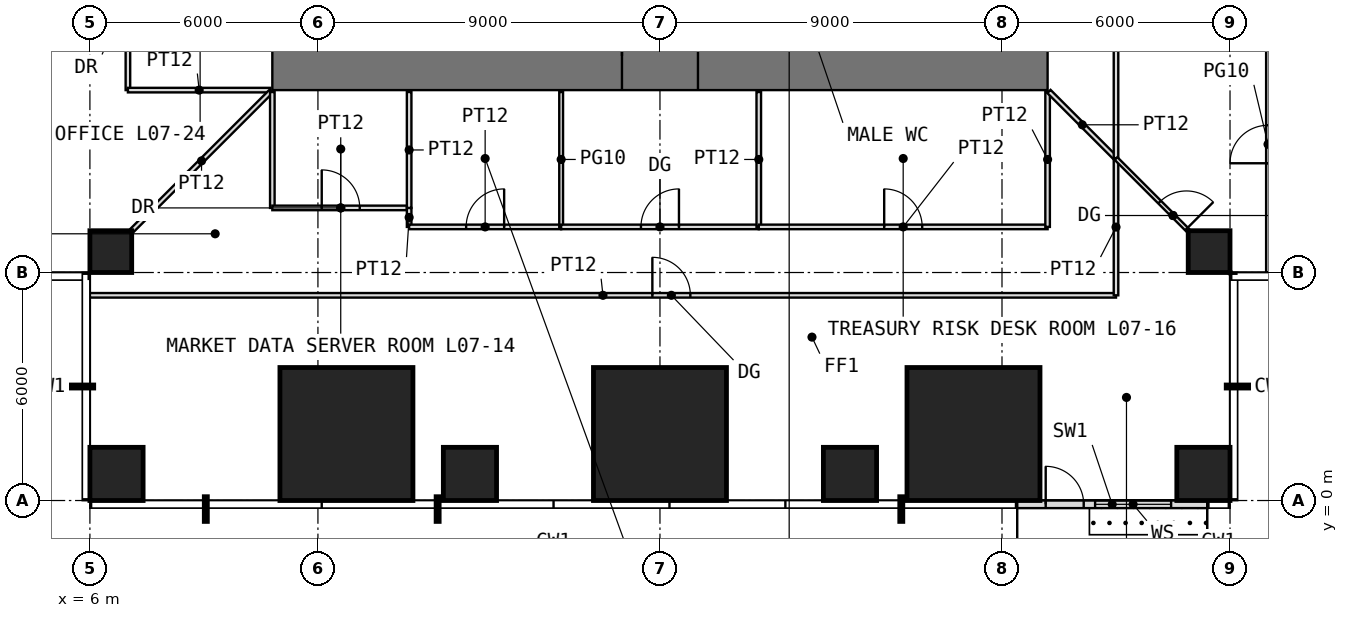
"""IFC4 building model, lengths in metres.
Left out: names, types, materials, properties, quantities, classifications, styles, units other than length and angle.
Written with IfcOpenShell. Run it as: python <this file> out.ifc"""

import sys

from ifc_helpers import new_model, si_unit, direction, frame, frame_2d, origin, origin_2d, place, context, subcontext, project, spatial, rectangle, extrude, element, fill, save


model = new_model("IFC4")
c1 = context("Model", 3, precision=1e-05, world=origin(), true_north=direction((0.0, 1.0)))
c2 = subcontext(c1, "Body", "Model", "MODEL_VIEW")
j1 = project(units=[si_unit("LENGTHUNIT", "METRE"), si_unit("PLANEANGLEUNIT", "RADIAN")], contexts=[c1])
p1 = place(None, origin())
s1 = spatial("IfcSite", under=j1, at=p1, CompositionType="ELEMENT")
p2 = place(p1, origin())
s2 = spatial("IfcBuilding", under=s1, at=p2, CompositionType="ELEMENT")
p3 = place(p2, frame((0.0, 0.0, 34.5)))
s3 = spatial("IfcBuildingStorey", under=s2, at=p3, CompositionType="ELEMENT", Elevation=34.5)
p4 = place(p3, frame((6.7, 0.7, 0.0), z_axis=(0.0, 0.0, 1.0), x_axis=(1.0, 0.0, 0.0)))
e1 = element("IfcColumn", 1, at=p4, inside=s3, PredefinedType="COLUMN", context=c2, shape_type="SweptSolid", body=[
    extrude(rectangle(XDim=1.4, YDim=1.4, at=origin_2d()), origin(), (0.0, 0.0, 1.0), 4.0),
])
p5 = place(p3, frame((12.75, 1.75, 0.0), z_axis=(0.0, 0.0, 1.0), x_axis=(1.0, 0.0, 0.0)))
e2 = element("IfcColumn", 2, at=p5, inside=s3, PredefinedType="COLUMN", context=c2, shape_type="SweptSolid", body=[
    extrude(rectangle(XDim=3.5, YDim=3.5, at=origin_2d()), origin(), (0.0, 0.0, 1.0), 4.0),
])
p6 = place(p3, frame((16.0, 0.7, 0.0), z_axis=(0.0, 0.0, 1.0), x_axis=(1.0, 0.0, 0.0)))
e3 = element("IfcColumn", 3, at=p6, inside=s3, PredefinedType="COLUMN", context=c2, shape_type="SweptSolid", body=[
    extrude(rectangle(XDim=1.4, YDim=1.4, at=origin_2d()), origin(), (0.0, 0.0, 1.0), 4.0),
])
p7 = place(p3, frame((21.0, 1.75, 0.0), z_axis=(0.0, 0.0, 1.0), x_axis=(1.0, 0.0, 0.0)))
e4 = element("IfcColumn", 4, at=p7, inside=s3, PredefinedType="COLUMN", context=c2, shape_type="SweptSolid", body=[
    extrude(rectangle(XDim=3.5, YDim=3.5, at=origin_2d()), origin(), (0.0, 0.0, 1.0), 4.0),
])
p8 = place(p3, frame((26.0, 0.7, 0.0), z_axis=(0.0, 0.0, 1.0), x_axis=(1.0, 0.0, 0.0)))
e5 = element("IfcColumn", 5, at=p8, inside=s3, PredefinedType="COLUMN", context=c2, shape_type="SweptSolid", body=[
    extrude(rectangle(XDim=1.4, YDim=1.4, at=origin_2d()), origin(), (0.0, 0.0, 1.0), 4.0),
])
p9 = place(p3, frame((29.25, 1.75, 0.0), z_axis=(0.0, 0.0, 1.0), x_axis=(1.0, 0.0, 0.0)))
e6 = element("IfcColumn", 6, at=p9, inside=s3, PredefinedType="COLUMN", context=c2, shape_type="SweptSolid", body=[
    extrude(rectangle(XDim=3.5, YDim=3.5, at=origin_2d()), origin(), (0.0, 0.0, 1.0), 4.0),
])
p10 = place(p3, frame((35.3, 0.7, 0.0), z_axis=(0.0, 0.0, 1.0), x_axis=(1.0, 0.0, 0.0)))
e7 = element("IfcColumn", 7, at=p10, inside=s3, PredefinedType="COLUMN", context=c2, shape_type="SweptSolid", body=[
    extrude(rectangle(XDim=1.4, YDim=1.4, at=origin_2d()), origin(), (0.0, 0.0, 1.0), 4.0),
])
for number, where, z_axis, x_axis in (
    (8, (6.55, 6.55, 0.0), (0.0, 0.0, 1.0), (1.0, 0.0, 0.0)),
    (9, (35.45, 6.55, 0.0), (0.0, 0.0, 1.0), (1.0, 0.0, 0.0)),
):
    element("IfcColumn", number, at=place(p3, frame(where, z_axis=z_axis, x_axis=x_axis)), inside=s3, PredefinedType="COLUMN", context=c2, shape_type="SweptSolid", body=[
        extrude(rectangle(XDim=1.1, YDim=1.1, at=origin_2d()), origin(), (0.0, 0.0, 1.0), 4.0),
    ])
p11 = place(p3, frame((30.4, -0.1, 0.0), z_axis=(0.0, 0.0, 1.0), x_axis=(1.0, 0.0, 0.0)))
e10 = element("IfcWall", 10, at=p11, inside=s3, PredefinedType="USERDEFINED", context=c2, shape_type="SweptSolid", body=[
    extrude(rectangle(XDim=5.0, YDim=0.2, at=frame_2d((2.5, 0.0))), origin(), (0.0, 0.0, 1.0), 3.75),
])
p12 = place(p11, frame((0.75, 0.0, 0.0)))
e11 = element("IfcOpeningElement", 11, at=p12, cuts=e10, PredefinedType="OPENING", context=c2, shape_type="SweptSolid", body=[
    extrude(rectangle(XDim=1.0, YDim=2.4, at=frame_2d((0.5, 1.2))), frame((0.0, 0.11, 0.0), z_axis=(0.0, -1.0, 0.0), x_axis=(1.0, 0.0, 0.0)), (0.0, 0.0, 1.0), 0.22),
])
p13 = place(p11, frame((2.05, 0.0, 0.3)))
e12 = element("IfcOpeningElement", 12, at=p13, cuts=e10, PredefinedType="OPENING", context=c2, shape_type="SweptSolid", body=[
    extrude(rectangle(XDim=2.0, YDim=2.7, at=frame_2d((1.0, 1.35))), frame((0.0, 0.11, 0.0), z_axis=(0.0, -1.0, 0.0), x_axis=(1.0, 0.0, 0.0)), (0.0, 0.0, 1.0), 0.22),
])
p14 = place(p3, frame((10.8, 11.7, -0.05), z_axis=(0.0, 0.0, 1.0), x_axis=(1.0, 0.0, 0.0)))
e13 = element("IfcWall", 13, at=p14, inside=s3, PredefinedType="SHEAR", context=c2, shape_type="SweptSolid", body=[
    extrude(rectangle(XDim=20.4, YDim=1.8, at=frame_2d((10.2, 0.0))), origin(), (0.0, 0.0, 1.0), 4.0),
])
p15 = place(p14, frame((9.2, 0.0, 0.05)))
e14 = element("IfcOpeningElement", 14, at=p15, cuts=e13, PredefinedType="OPENING", context=c2, shape_type="SweptSolid", body=[
    extrude(rectangle(XDim=2.0, YDim=2.2, at=frame_2d((1.0, 1.1))), frame((0.0, 0.91, 0.0), z_axis=(0.0, -1.0, 0.0), x_axis=(1.0, 0.0, 0.0)), (0.0, 0.0, 1.0), 1.82),
])
p16 = place(p3, frame((6.0, 5.4, 0.0), z_axis=(0.0, 0.0, 1.0), x_axis=(1.0, 0.0, 0.0)))
e15 = element("IfcWall", 15, at=p16, inside=s3, PredefinedType="PARTITIONING", context=c2, shape_type="SweptSolid", body=[
    extrude(rectangle(XDim=27.0, YDim=0.12, at=frame_2d((13.5, 0.0))), origin(), (0.0, 0.0, 1.0), 3.75),
])
p17 = place(p16, frame((14.8, 0.0, 0.0)))
e16 = element("IfcOpeningElement", 16, at=p17, cuts=e15, PredefinedType="OPENING", context=c2, shape_type="SweptSolid", body=[
    extrude(rectangle(XDim=1.0, YDim=2.4, at=frame_2d((0.5, 1.2))), frame((0.0, 0.07, 0.0), z_axis=(0.0, -1.0, 0.0), x_axis=(1.0, 0.0, 0.0)), (0.0, 0.0, 1.0), 0.14),
])
p18 = place(p3, frame((7.0, 10.8, 0.0), z_axis=(0.0, 0.0, 1.0), x_axis=(0.0, 1.0, 0.0)))
e17 = element("IfcWall", 17, at=p18, inside=s3, PredefinedType="PARTITIONING", context=c2, shape_type="SweptSolid", body=[
    extrude(rectangle(XDim=5.0, YDim=0.12, at=frame_2d((2.5, 0.0))), origin(), (0.0, 0.0, 1.0), 3.75),
])
p19 = place(p18, frame((2.0, 0.0, 0.0)))
e18 = element("IfcOpeningElement", 18, at=p19, cuts=e17, PredefinedType="OPENING", context=c2, shape_type="SweptSolid", body=[
    extrude(rectangle(XDim=1.0, YDim=2.2, at=frame_2d((0.5, 1.1))), frame((0.0, 0.07, 0.0), z_axis=(0.0, -1.0, 0.0), x_axis=(1.0, 0.0, 0.0)), (0.0, 0.0, 1.0), 0.14),
])
p20 = place(p3, frame((7.0, 10.8, 0.0), z_axis=(0.0, 0.0, 1.0), x_axis=(1.0, 0.0, 0.0)))
e19 = element("IfcWall", 19, at=p20, inside=s3, PredefinedType="PARTITIONING", context=c2, shape_type="SweptSolid", body=[
    extrude(rectangle(XDim=3.75, YDim=0.12, at=frame_2d((1.875, 0.0))), origin(), (0.0, 0.0, 1.0), 3.75),
])
p21 = place(p3, frame((7.11, 7.11, 0.0), z_axis=(0.0, 0.0, 1.0), x_axis=(0.707106781187, 0.707106781187, 0.0)))
e20 = element("IfcWall", 20, at=p21, inside=s3, PredefinedType="PARTITIONING", context=c2, shape_type="SweptSolid", body=[
    extrude(rectangle(XDim=5.168, YDim=0.12, at=frame_2d((2.584, 0.0))), origin(), (0.0, 0.0, 1.0), 3.75),
])
p22 = place(p3, frame((10.8, 7.7, 0.0), z_axis=(0.0, 0.0, 1.0), x_axis=(0.0, 1.0, 0.0)))
e21 = element("IfcWall", 21, at=p22, inside=s3, PredefinedType="PARTITIONING", context=c2, shape_type="SweptSolid", body=[
    extrude(rectangle(XDim=3.05, YDim=0.12, at=frame_2d((1.525, 0.0))), origin(), (0.0, 0.0, 1.0), 3.75),
])
p23 = place(p3, frame((10.8, 7.7, 0.0), z_axis=(0.0, 0.0, 1.0), x_axis=(1.0, 0.0, 0.0)))
e22 = element("IfcWall", 22, at=p23, inside=s3, PredefinedType="PARTITIONING", context=c2, shape_type="SweptSolid", body=[
    extrude(rectangle(XDim=3.6, YDim=0.12, at=frame_2d((1.8, 0.0))), origin(), (0.0, 0.0, 1.0), 3.75),
])
p24 = place(p23, frame((1.3, 0.0, 0.0)))
e23 = element("IfcOpeningElement", 23, at=p24, cuts=e22, PredefinedType="OPENING", context=c2, shape_type="SweptSolid", body=[
    extrude(rectangle(XDim=1.0, YDim=2.2, at=frame_2d((0.5, 1.1))), frame((0.0, 0.07, 0.0), z_axis=(0.0, -1.0, 0.0), x_axis=(1.0, 0.0, 0.0)), (0.0, 0.0, 1.0), 0.14),
])
p25 = place(p3, frame((14.4, 7.2, 0.0), z_axis=(0.0, 0.0, 1.0), x_axis=(0.0, 1.0, 0.0)))
e24 = element("IfcWall", 24, at=p25, inside=s3, PredefinedType="PARTITIONING", context=c2, shape_type="SweptSolid", body=[
    extrude(rectangle(XDim=0.5, YDim=0.12, at=frame_2d((0.25, 0.0))), origin(), (0.0, 0.0, 1.0), 3.75),
])
p26 = place(p3, frame((14.4, 7.2, 0.0), z_axis=(0.0, 0.0, 1.0), x_axis=(1.0, 0.0, 0.0)))
e25 = element("IfcWall", 25, at=p26, inside=s3, PredefinedType="PARTITIONING", context=c2, shape_type="SweptSolid", body=[
    extrude(rectangle(XDim=4.0, YDim=0.12, at=frame_2d((2.0, 0.0))), origin(), (0.0, 0.0, 1.0), 3.75),
])
p27 = place(p26, frame((1.5, 0.0, 0.0)))
e26 = element("IfcOpeningElement", 26, at=p27, cuts=e25, PredefinedType="OPENING", context=c2, shape_type="SweptSolid", body=[
    extrude(rectangle(XDim=1.0, YDim=2.4, at=frame_2d((0.5, 1.2))), frame((0.0, 0.07, 0.0), z_axis=(0.0, -1.0, 0.0), x_axis=(1.0, 0.0, 0.0)), (0.0, 0.0, 1.0), 0.14),
])
p28 = place(p3, frame((14.4, 7.7, 0.0), z_axis=(0.0, 0.0, 1.0), x_axis=(0.0, 1.0, 0.0)))
e27 = element("IfcWall", 27, at=p28, inside=s3, PredefinedType="PARTITIONING", context=c2, shape_type="SweptSolid", body=[
    extrude(rectangle(XDim=3.05, YDim=0.12, at=frame_2d((1.525, 0.0))), origin(), (0.0, 0.0, 1.0), 3.75),
])
p29 = place(p3, frame((18.4, 7.2, 0.0), z_axis=(0.0, 0.0, 1.0), x_axis=(0.0, 1.0, 0.0)))
e28 = element("IfcWall", 28, at=p29, inside=s3, PredefinedType="PARTITIONING", context=c2, shape_type="SweptSolid", body=[
    extrude(rectangle(XDim=3.55, YDim=0.1, at=frame_2d((1.775, 0.0))), origin(), (0.0, 0.0, 1.0), 3.75),
])
p30 = place(p3, frame((18.4, 7.2, 0.0), z_axis=(0.0, 0.0, 1.0), x_axis=(1.0, 0.0, 0.0)))
e29 = element("IfcWall", 29, at=p30, inside=s3, PredefinedType="PARTITIONING", context=c2, shape_type="SweptSolid", body=[
    extrude(rectangle(XDim=5.2, YDim=0.12, at=frame_2d((2.6, 0.0))), origin(), (0.0, 0.0, 1.0), 3.75),
])
p31 = place(p30, frame((2.1, 0.0, 0.0)))
e30 = element("IfcOpeningElement", 30, at=p31, cuts=e29, PredefinedType="OPENING", context=c2, shape_type="SweptSolid", body=[
    extrude(rectangle(XDim=1.0, YDim=2.4, at=frame_2d((0.5, 1.2))), frame((0.0, 0.07, 0.0), z_axis=(0.0, -1.0, 0.0), x_axis=(1.0, 0.0, 0.0)), (0.0, 0.0, 1.0), 0.14),
])
p32 = place(p3, frame((23.6, 7.2, 0.0), z_axis=(0.0, 0.0, 1.0), x_axis=(0.0, 1.0, 0.0)))
e31 = element("IfcWall", 31, at=p32, inside=s3, PredefinedType="PARTITIONING", context=c2, shape_type="SweptSolid", body=[
    extrude(rectangle(XDim=3.55, YDim=0.12, at=frame_2d((1.775, 0.0))), origin(), (0.0, 0.0, 1.0), 3.75),
])
p33 = place(p3, frame((23.6, 7.2, 0.0), z_axis=(0.0, 0.0, 1.0), x_axis=(1.0, 0.0, 0.0)))
e32 = element("IfcWall", 32, at=p33, inside=s3, PredefinedType="PARTITIONING", context=c2, shape_type="SweptSolid", body=[
    extrude(rectangle(XDim=7.6, YDim=0.12, at=frame_2d((3.8, 0.0))), origin(), (0.0, 0.0, 1.0), 3.75),
])
p34 = place(p33, frame((3.3, 0.0, 0.0)))
e33 = element("IfcOpeningElement", 33, at=p34, cuts=e32, PredefinedType="OPENING", context=c2, shape_type="SweptSolid", body=[
    extrude(rectangle(XDim=1.0, YDim=2.2, at=frame_2d((0.5, 1.1))), frame((0.0, 0.07, 0.0), z_axis=(0.0, -1.0, 0.0), x_axis=(1.0, 0.0, 0.0)), (0.0, 0.0, 1.0), 0.14),
])
p35 = place(p3, frame((31.2, 7.2, 0.0), z_axis=(0.0, 0.0, 1.0), x_axis=(0.0, 1.0, 0.0)))
e34 = element("IfcWall", 34, at=p35, inside=s3, PredefinedType="PARTITIONING", context=c2, shape_type="SweptSolid", body=[
    extrude(rectangle(XDim=3.55, YDim=0.12, at=frame_2d((1.775, 0.0))), origin(), (0.0, 0.0, 1.0), 3.75),
])
p36 = place(p3, frame((31.235, 10.765, 0.0), z_axis=(0.0, 0.0, 1.0), x_axis=(0.707106781187, -0.707106781187, 0.0)))
e35 = element("IfcWall", 35, at=p36, inside=s3, PredefinedType="PARTITIONING", context=c2, shape_type="SweptSolid", body=[
    extrude(rectangle(XDim=2.481, YDim=0.12, at=frame_2d((1.241, 0.0))), origin(), (0.0, 0.0, 1.0), 3.75),
])
p37 = place(p3, frame((33.0, 5.4, 0.0), z_axis=(0.0, 0.0, 1.0), x_axis=(0.0, 1.0, 0.0)))
e36 = element("IfcWall", 36, at=p37, inside=s3, PredefinedType="PARTITIONING", context=c2, shape_type="SweptSolid", body=[
    extrude(rectangle(XDim=3.59, YDim=0.12, at=frame_2d((1.795, 0.0))), origin(), (0.0, 0.0, 1.0), 3.75),
])
p38 = place(p3, frame((33.0, 9.01, 0.0), z_axis=(0.0, 0.0, 1.0), x_axis=(0.0, 1.0, 0.0)))
e37 = element("IfcWall", 37, at=p38, inside=s3, PredefinedType="PARTITIONING", context=c2, shape_type="SweptSolid", body=[
    extrude(rectangle(XDim=23.98, YDim=0.12, at=frame_2d((11.99, 0.0))), origin(), (0.0, 0.0, 1.0), 3.75),
])
p39 = place(p38, frame((11.49, 0.0, 0.0)))
e38 = element("IfcOpeningElement", 38, at=p39, cuts=e37, PredefinedType="OPENING", context=c2, shape_type="SweptSolid", body=[
    extrude(rectangle(XDim=1.0, YDim=2.4, at=frame_2d((0.5, 1.2))), frame((0.0, 0.07, 0.0), z_axis=(0.0, -1.0, 0.0), x_axis=(1.0, 0.0, 0.0)), (0.0, 0.0, 1.0), 0.14),
])
p40 = place(p3, frame((37.0, 6.0, 0.0), z_axis=(0.0, 0.0, 1.0), x_axis=(0.0, 1.0, 0.0)))
e39 = element("IfcWall", 39, at=p40, inside=s3, PredefinedType="PARTITIONING", context=c2, shape_type="SweptSolid", body=[
    extrude(rectangle(XDim=6.75, YDim=0.1, at=frame_2d((3.375, 0.0))), origin(), (0.0, 0.0, 1.0), 3.75),
])
p41 = place(p40, frame((2.875, 0.0, 0.0)))
e40 = element("IfcOpeningElement", 40, at=p41, cuts=e39, PredefinedType="OPENING", context=c2, shape_type="SweptSolid", body=[
    extrude(rectangle(XDim=1.0, YDim=2.4, at=frame_2d((0.5, 1.2))), frame((0.0, 0.06, 0.0), z_axis=(0.0, -1.0, 0.0), x_axis=(1.0, 0.0, 0.0)), (0.0, 0.0, 1.0), 0.12),
])
p42 = place(p3, frame((33.0, 9.0, 0.0), z_axis=(0.0, 0.0, 1.0), x_axis=(0.707106781187, -0.707106781187, 0.0)))
e41 = element("IfcWall", 41, at=p42, inside=s3, PredefinedType="PARTITIONING", context=c2, shape_type="SweptSolid", body=[
    extrude(rectangle(XDim=4.243, YDim=0.1, at=frame_2d((2.121, 0.0))), origin(), (0.0, 0.0, 1.0), 3.75),
])
p43 = place(p42, frame((1.621, 0.0, 0.0)))
e42 = element("IfcOpeningElement", 42, at=p43, cuts=e41, PredefinedType="OPENING", context=c2, shape_type="SweptSolid", body=[
    extrude(rectangle(XDim=1.0, YDim=2.4, at=frame_2d((0.5, 1.2))), frame((0.0, 0.06, 0.0), z_axis=(0.0, -1.0, 0.0), x_axis=(1.0, 0.0, 0.0)), (0.0, 0.0, 1.0), 0.12),
])
p44 = place(p12, origin())
e43 = element("IfcDoor", 43, at=p44, inside=s3, OperationType="SINGLE_SWING_LEFT", PredefinedType="DOOR", context=c2, shape_type="SweptSolid", body=[
    extrude(rectangle(XDim=1.0, YDim=2.4, at=frame_2d((0.5, 1.2))), frame((0.0, 0.025, 0.0), z_axis=(0.0, -1.0, 0.0), x_axis=(1.0, 0.0, 0.0)), (0.0, 0.0, 1.0), 0.05),
])
fill(e11, e43)
p45 = place(p13, origin())
e44 = element("IfcWindow", 44, at=p45, inside=s3, PartitioningType="SINGLE_PANEL", PredefinedType="WINDOW", context=c2, shape_type="SweptSolid", body=[
    extrude(rectangle(XDim=2.0, YDim=2.7, at=frame_2d((1.0, 1.35))), frame((0.0, 0.03, 0.0), z_axis=(0.0, -1.0, 0.0), x_axis=(1.0, 0.0, 0.0)), (0.0, 0.0, 1.0), 0.06),
])
fill(e12, e44)
p46 = place(p15, origin())
e45 = element("IfcDoor", 45, at=p46, inside=s3, OperationType="DOUBLE_DOOR_SINGLE_SWING", PredefinedType="DOOR", context=c2, shape_type="SweptSolid", body=[
    extrude(rectangle(XDim=2.0, YDim=2.2, at=frame_2d((1.0, 1.1))), frame((0.0, 0.025, 0.0), z_axis=(0.0, -1.0, 0.0), x_axis=(1.0, 0.0, 0.0)), (0.0, 0.0, 1.0), 0.05),
])
fill(e14, e45)
p47 = place(p24, origin())
e46 = element("IfcDoor", 46, at=p47, inside=s3, OperationType="SINGLE_SWING_LEFT", PredefinedType="DOOR", context=c2, shape_type="SweptSolid", body=[
    extrude(rectangle(XDim=1.0, YDim=2.2, at=frame_2d((0.5, 1.1))), frame((0.0, 0.025, 0.0), z_axis=(0.0, -1.0, 0.0), x_axis=(1.0, 0.0, 0.0)), (0.0, 0.0, 1.0), 0.05),
])
fill(e23, e46)
p48 = place(p27, origin())
e47 = element("IfcDoor", 47, at=p48, inside=s3, OperationType="SINGLE_SWING_RIGHT", PredefinedType="DOOR", context=c2, shape_type="SweptSolid", body=[
    extrude(rectangle(XDim=1.0, YDim=2.4, at=frame_2d((0.5, 1.2))), frame((0.0, 0.025, 0.0), z_axis=(0.0, -1.0, 0.0), x_axis=(1.0, 0.0, 0.0)), (0.0, 0.0, 1.0), 0.05),
])
fill(e26, e47)
p49 = place(p34, origin())
e48 = element("IfcDoor", 48, at=p49, inside=s3, OperationType="SINGLE_SWING_LEFT", PredefinedType="DOOR", context=c2, shape_type="SweptSolid", body=[
    extrude(rectangle(XDim=1.0, YDim=2.2, at=frame_2d((0.5, 1.1))), frame((0.0, 0.025, 0.0), z_axis=(0.0, -1.0, 0.0), x_axis=(1.0, 0.0, 0.0)), (0.0, 0.0, 1.0), 0.05),
])
fill(e33, e48)
p50 = place(p41, origin())
e49 = element("IfcDoor", 49, at=p50, inside=s3, OperationType="SINGLE_SWING_LEFT", PredefinedType="DOOR", context=c2, shape_type="SweptSolid", body=[
    extrude(rectangle(XDim=1.0, YDim=2.4, at=frame_2d((0.5, 1.2))), frame((0.0, 0.025, 0.0), z_axis=(0.0, -1.0, 0.0), x_axis=(1.0, 0.0, 0.0)), (0.0, 0.0, 1.0), 0.05),
])
fill(e40, e49)
p51 = place(p17, origin())
e50 = element("IfcDoor", 50, at=p51, inside=s3, OperationType="SINGLE_SWING_LEFT", PredefinedType="DOOR", context=c2, shape_type="SweptSolid", body=[
    extrude(rectangle(XDim=1.0, YDim=2.4, at=frame_2d((0.5, 1.2))), frame((0.0, 0.025, 0.0), z_axis=(0.0, -1.0, 0.0), x_axis=(1.0, 0.0, 0.0)), (0.0, 0.0, 1.0), 0.05),
])
fill(e16, e50)
p52 = place(p31, origin())
e51 = element("IfcDoor", 51, at=p52, inside=s3, OperationType="SINGLE_SWING_RIGHT", PredefinedType="DOOR", context=c2, shape_type="SweptSolid", body=[
    extrude(rectangle(XDim=1.0, YDim=2.4, at=frame_2d((0.5, 1.2))), frame((0.0, 0.025, 0.0), z_axis=(0.0, -1.0, 0.0), x_axis=(1.0, 0.0, 0.0)), (0.0, 0.0, 1.0), 0.05),
])
fill(e30, e51)
p53 = place(p43, origin())
e52 = element("IfcDoor", 52, at=p53, inside=s3, OperationType="SINGLE_SWING_RIGHT", PredefinedType="DOOR", context=c2, shape_type="SweptSolid", body=[
    extrude(rectangle(XDim=1.0, YDim=2.4, at=frame_2d((0.5, 1.2))), frame((0.0, 0.025, 0.0), z_axis=(0.0, -1.0, 0.0), x_axis=(1.0, 0.0, 0.0)), (0.0, 0.0, 1.0), 0.05),
])
fill(e42, e52)
save(model, sys.argv[1])
